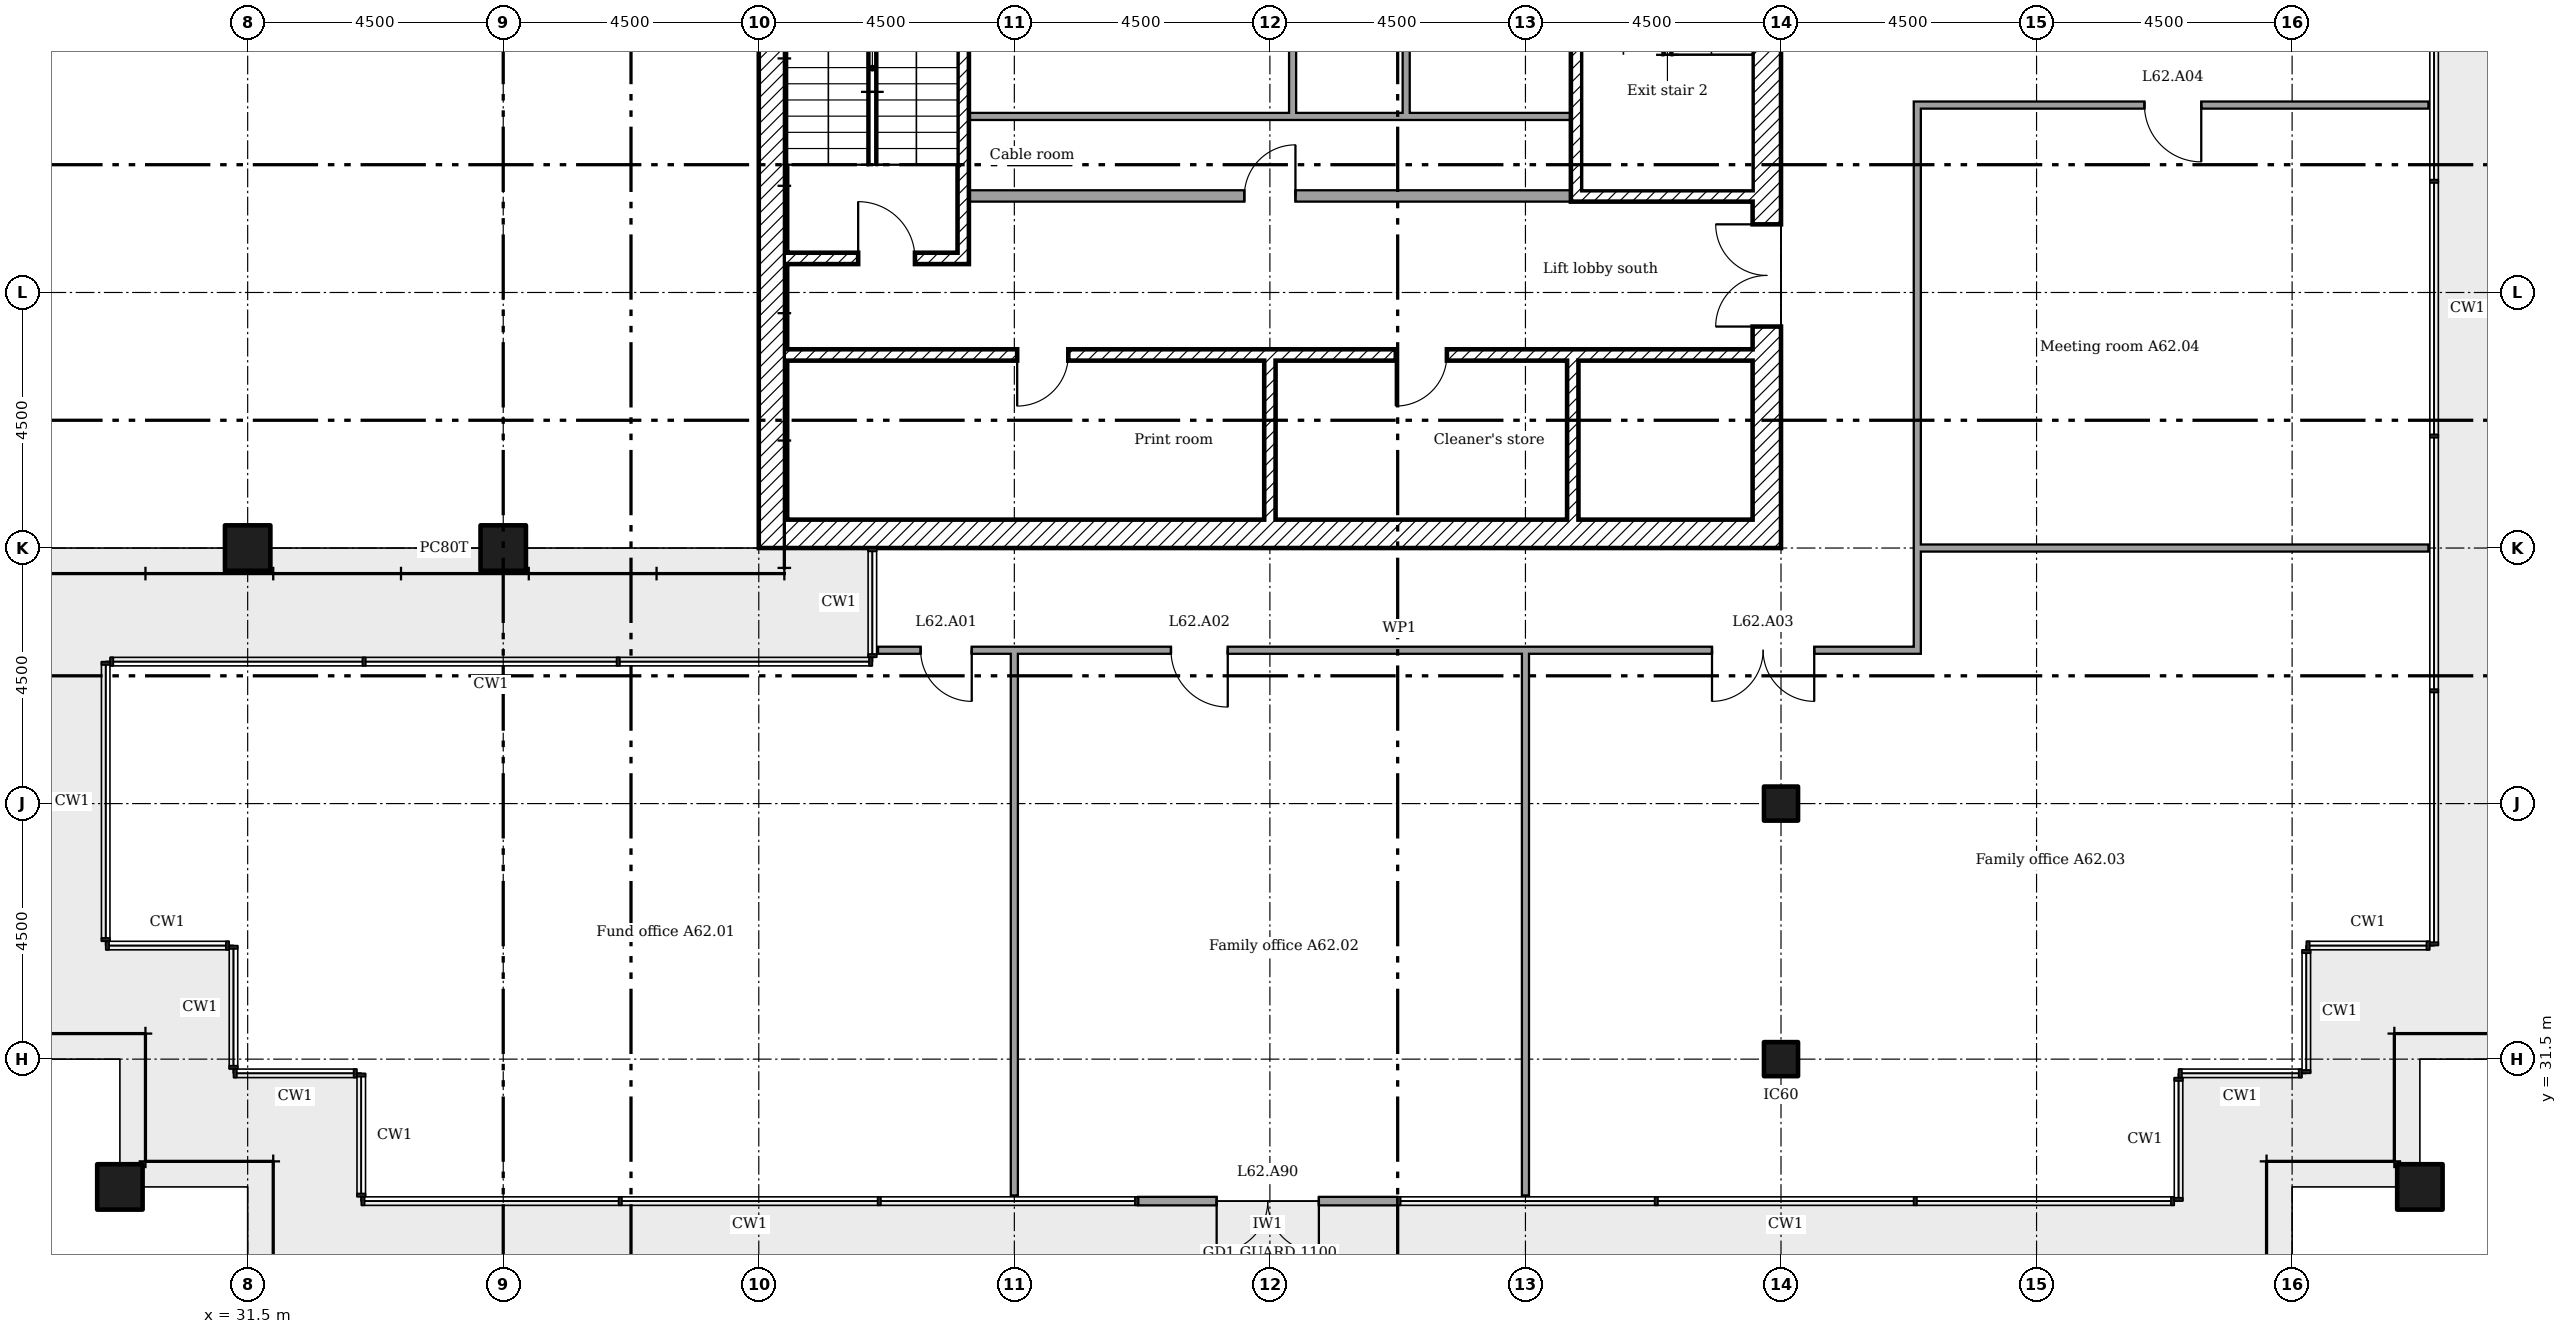
"""IFC4 building model, lengths in metres.
Left out: names, types, materials, properties, quantities, classifications, styles, units other than length and angle.
Written with IfcOpenShell. Run it as: python <this file> out.ifc"""

import sys

from ifc_helpers import new_model, si_unit, direction, frame, frame_2d, origin, origin_2d, place, context, subcontext, project, spatial, rectangle, extrude, element, fill, save


model = new_model("IFC4")
c1 = context("Model", 3, precision=1e-05, world=origin(), true_north=direction((0.0, 1.0)))
c2 = subcontext(c1, "Body", "Model", "MODEL_VIEW")
j1 = project(units=[si_unit("LENGTHUNIT", "METRE"), si_unit("PLANEANGLEUNIT", "RADIAN")], contexts=[c1])
p1 = place(None, origin())
s1 = spatial("IfcSite", under=j1, at=p1, CompositionType="ELEMENT")
p2 = place(p1, origin())
s2 = spatial("IfcBuilding", under=s1, at=p2, CompositionType="ELEMENT")
p3 = place(p2, frame((0.0, 0.0, 242.4)))
s3 = spatial("IfcBuildingStorey", under=s2, at=p3, CompositionType="ELEMENT", Elevation=242.4)
for number, where in (
    (1, (69.75, 29.25, 0.0)),
    (2, (36.0, 40.5, 0.0)),
    (3, (31.5, 40.5, 0.0)),
    (4, (29.25, 29.25, 0.0)),
):
    element("IfcColumn", number, at=place(p3, frame(where)), inside=s3, PredefinedType="COLUMN", context=c2, shape_type="SweptSolid", body=[
        extrude(rectangle(XDim=0.8, YDim=0.8, at=origin_2d()), origin(), (0.0, 0.0, 1.0), 3.6),
    ])
for number, where in (
    (5, (58.5, 31.5, 0.0)),
    (6, (58.5, 36.0, 0.0)),
):
    element("IfcColumn", number, at=place(p3, frame(where)), inside=s3, PredefinedType="COLUMN", context=c2, shape_type="SweptSolid", body=[
        extrude(rectangle(XDim=0.6, YDim=0.6, at=origin_2d()), origin(), (0.0, 0.0, 1.0), 3.6),
    ])
p4 = place(p3, frame((47.182, 29.0, 0.0)))
e7 = element("IfcWall", 7, at=p4, inside=s3, PredefinedType="SOLIDWALL", context=c2, shape_type="SweptSolid", body=[
    extrude(rectangle(XDim=4.561, YDim=0.15, at=frame_2d((2.28, 0.0))), origin(), (0.0, 0.0, 1.0), 3.4),
])
p5 = place(p4, frame((1.38, 0.0, 0.0)))
e8 = element("IfcOpeningElement", 8, at=p5, cuts=e7, PredefinedType="OPENING", context=c2, shape_type="SweptSolid", body=[
    extrude(rectangle(XDim=1.8, YDim=2.4, at=frame_2d((0.9, 1.2))), frame((0.0, 0.085, 0.0), z_axis=(0.0, -1.0, 0.0), x_axis=(1.0, 0.0, 0.0)), (0.0, 0.0, 1.0), 0.17),
])
p6 = place(p3, frame((58.25, 40.5, 0.0), z_axis=(0.0, 0.0, 1.0), x_axis=(0.0, 1.0, 0.0)))
e9 = element("IfcWall", 9, at=p6, inside=s3, PredefinedType="SHEAR", context=c2, shape_type="SweptSolid", body=[
    extrude(rectangle(XDim=18.0, YDim=0.5, at=frame_2d((9.0, 0.0))), origin(), (0.0, 0.0, 1.0), 3.3),
])
p7 = place(p6, frame((13.15, 0.0, 0.0)))
e10 = element("IfcOpeningElement", 10, at=p7, cuts=e9, PredefinedType="OPENING", context=c2, shape_type="SweptSolid", body=[
    extrude(rectangle(XDim=1.2, YDim=2.1, at=frame_2d((0.6, 1.05))), frame((0.0, 0.26, 0.0), z_axis=(0.0, -1.0, 0.0), x_axis=(1.0, 0.0, 0.0)), (0.0, 0.0, 1.0), 0.52),
])
p8 = place(p6, frame((3.9, 0.0, 0.0)))
e11 = element("IfcOpeningElement", 11, at=p8, cuts=e9, PredefinedType="OPENING", context=c2, shape_type="SweptSolid", body=[
    extrude(rectangle(XDim=1.8, YDim=2.1, at=frame_2d((0.9, 1.05))), frame((0.0, 0.26, 0.0), z_axis=(0.0, -1.0, 0.0), x_axis=(1.0, 0.0, 0.0)), (0.0, 0.0, 1.0), 0.52),
])
p9 = place(p6, frame((11.525, 0.0, 0.0)))
e12 = element("IfcOpeningElement", 12, at=p9, cuts=e9, PredefinedType="OPENING", context=c2, shape_type="SweptSolid", body=[
    extrude(rectangle(XDim=1.0, YDim=2.1, at=frame_2d((0.5, 1.05))), frame((0.0, 0.26, 0.0), z_axis=(0.0, -1.0, 0.0), x_axis=(1.0, 0.0, 0.0)), (0.0, 0.0, 1.0), 0.52),
])
p10 = place(p3, frame((40.5, 40.75, 0.0)))
e13 = element("IfcWall", 13, at=p10, inside=s3, PredefinedType="SHEAR", context=c2, shape_type="SweptSolid", body=[
    extrude(rectangle(XDim=17.5, YDim=0.5, at=frame_2d((8.75, 0.0))), origin(), (0.0, 0.0, 1.0), 3.3),
])
p11 = place(p3, frame((40.75, 41.0, 0.0), z_axis=(0.0, 0.0, 1.0), x_axis=(0.0, 1.0, 0.0)))
e14 = element("IfcWall", 14, at=p11, inside=s3, PredefinedType="SHEAR", context=c2, shape_type="SweptSolid", body=[
    extrude(rectangle(XDim=17.0, YDim=0.5, at=frame_2d((8.5, 0.0))), origin(), (0.0, 0.0, 1.0), 3.3),
])
for number, where, z_axis, x_axis in (
    (15, (49.5, 41.0, 0.0), (0.0, 0.0, 1.0), (0.0, 1.0, 0.0)),
    (16, (54.833, 41.0, 0.0), (0.0, 0.0, 1.0), (0.0, 1.0, 0.0)),
):
    element("IfcWall", number, at=place(p3, frame(where, z_axis=z_axis, x_axis=x_axis)), inside=s3, PredefinedType="SHEAR", context=c2, shape_type="SweptSolid", body=[
        extrude(rectangle(XDim=2.8, YDim=0.2, at=frame_2d((1.4, 0.0))), origin(), (0.0, 0.0, 1.0), 3.3),
    ])
p12 = place(p3, frame((41.0, 43.9, 0.0)))
e17 = element("IfcWall", 17, at=p12, inside=s3, PredefinedType="SHEAR", context=c2, shape_type="SweptSolid", body=[
    extrude(rectangle(XDim=17.0, YDim=0.2, at=frame_2d((8.5, 0.0))), origin(), (0.0, 0.0, 1.0), 3.3),
])
p13 = place(p12, frame((4.05, 0.0, 0.0)))
e18 = element("IfcOpeningElement", 18, at=p13, cuts=e17, PredefinedType="OPENING", context=c2, shape_type="SweptSolid", body=[
    extrude(rectangle(XDim=0.9, YDim=2.1, at=frame_2d((0.45, 1.05))), frame((0.0, 0.11, 0.0), z_axis=(0.0, -1.0, 0.0), x_axis=(1.0, 0.0, 0.0)), (0.0, 0.0, 1.0), 0.22),
])
p14 = place(p12, frame((10.717, 0.0, 0.0)))
e19 = element("IfcOpeningElement", 19, at=p14, cuts=e17, PredefinedType="OPENING", context=c2, shape_type="SweptSolid", body=[
    extrude(rectangle(XDim=0.9, YDim=2.1, at=frame_2d((0.45, 1.05))), frame((0.0, 0.11, 0.0), z_axis=(0.0, -1.0, 0.0), x_axis=(1.0, 0.0, 0.0)), (0.0, 0.0, 1.0), 0.22),
])
p15 = place(p3, frame((44.1, 45.5, 0.0), z_axis=(0.0, 0.0, 1.0), x_axis=(0.0, 1.0, 0.0)))
e20 = element("IfcWall", 20, at=p15, inside=s3, PredefinedType="SHEAR", context=c2, shape_type="SweptSolid", body=[
    extrude(rectangle(XDim=6.9, YDim=0.2, at=frame_2d((3.45, 0.0))), origin(), (0.0, 0.0, 1.0), 3.3),
])
p16 = place(p3, frame((41.0, 45.6, 0.0)))
e21 = element("IfcWall", 21, at=p16, inside=s3, PredefinedType="SHEAR", context=c2, shape_type="SweptSolid", body=[
    extrude(rectangle(XDim=3.0, YDim=0.2, at=frame_2d((1.5, 0.0))), origin(), (0.0, 0.0, 1.0), 3.3),
])
p17 = place(p16, frame((1.25, 0.0, 0.0)))
e22 = element("IfcOpeningElement", 22, at=p17, cuts=e21, PredefinedType="OPENING", context=c2, shape_type="SweptSolid", body=[
    extrude(rectangle(XDim=1.0, YDim=2.1, at=frame_2d((0.5, 1.05))), frame((0.0, 0.11, 0.0), z_axis=(0.0, -1.0, 0.0), x_axis=(1.0, 0.0, 0.0)), (0.0, 0.0, 1.0), 0.22),
])
p18 = place(p3, frame((54.8, 46.7, 0.0)))
e23 = element("IfcWall", 23, at=p18, inside=s3, PredefinedType="SHEAR", context=c2, shape_type="SweptSolid", body=[
    extrude(rectangle(XDim=3.2, YDim=0.2, at=frame_2d((1.6, 0.0))), origin(), (0.0, 0.0, 1.0), 3.3),
])
p19 = place(p3, frame((54.9, 46.8, 0.0), z_axis=(0.0, 0.0, 1.0), x_axis=(0.0, 1.0, 0.0)))
e24 = element("IfcWall", 24, at=p19, inside=s3, PredefinedType="SHEAR", context=c2, shape_type="SweptSolid", body=[
    extrude(rectangle(XDim=6.5, YDim=0.2, at=frame_2d((3.25, 0.0))), origin(), (0.0, 0.0, 1.0), 3.3),
])
p20 = place(p3, frame((44.2, 46.7, 0.0)))
e25 = element("IfcWall", 25, at=p20, inside=s3, PredefinedType="PARTITIONING", context=c2, shape_type="SweptSolid", body=[
    extrude(rectangle(XDim=10.6, YDim=0.2, at=frame_2d((5.3, 0.0))), origin(), (0.0, 0.0, 1.0), 3.3),
])
p21 = place(p20, frame((4.85, 0.0, 0.0)))
e26 = element("IfcOpeningElement", 26, at=p21, cuts=e25, PredefinedType="OPENING", context=c2, shape_type="SweptSolid", body=[
    extrude(rectangle(XDim=0.9, YDim=2.1, at=frame_2d((0.45, 1.05))), frame((0.0, 0.11, 0.0), z_axis=(0.0, -1.0, 0.0), x_axis=(1.0, 0.0, 0.0)), (0.0, 0.0, 1.0), 0.22),
])
p22 = place(p3, frame((49.962, 48.1, 0.0), z_axis=(0.0, 0.0, 1.0), x_axis=(-1.0, 0.0, 0.0)))
e27 = element("IfcWall", 27, at=p22, inside=s3, PredefinedType="PARTITIONING", context=c2, shape_type="SweptSolid", body=[
    extrude(rectangle(XDim=5.762, YDim=0.125, at=frame_2d((2.881, 0.0))), origin(), (0.0, 0.0, 1.0), 3.3),
])
p23 = place(p3, frame((51.962, 48.1, 0.0), z_axis=(0.0, 0.0, 1.0), x_axis=(-1.0, 0.0, 0.0)))
e28 = element("IfcWall", 28, at=p23, inside=s3, PredefinedType="PARTITIONING", context=c2, shape_type="SweptSolid", body=[
    extrude(rectangle(XDim=2.062, YDim=0.125, at=frame_2d((1.031, 0.0))), origin(), (0.0, 0.0, 1.0), 3.3),
])
p24 = place(p3, frame((49.9, 48.163, 0.0), z_axis=(0.0, 0.0, 1.0), x_axis=(0.0, 1.0, 0.0)))
e29 = element("IfcWall", 29, at=p24, inside=s3, PredefinedType="PARTITIONING", context=c2, shape_type="SweptSolid", body=[
    extrude(rectangle(XDim=3.637, YDim=0.125, at=frame_2d((1.819, 0.0))), origin(), (0.0, 0.0, 1.0), 3.3),
])
p25 = place(p3, frame((54.8, 48.1, 0.0), z_axis=(0.0, 0.0, 1.0), x_axis=(-1.0, 0.0, 0.0)))
e30 = element("IfcWall", 30, at=p25, inside=s3, PredefinedType="PARTITIONING", context=c2, shape_type="SweptSolid", body=[
    extrude(rectangle(XDim=2.9, YDim=0.125, at=frame_2d((1.45, 0.0))), origin(), (0.0, 0.0, 1.0), 3.3),
])
p26 = place(p3, frame((51.9, 48.163, 0.0), z_axis=(0.0, 0.0, 1.0), x_axis=(0.0, 1.0, 0.0)))
e31 = element("IfcWall", 31, at=p26, inside=s3, PredefinedType="PARTITIONING", context=c2, shape_type="SweptSolid", body=[
    extrude(rectangle(XDim=3.637, YDim=0.125, at=frame_2d((1.819, 0.0))), origin(), (0.0, 0.0, 1.0), 3.3),
])
p27 = place(p3, frame((42.6, 38.7, 0.0)))
e32 = element("IfcWall", 32, at=p27, inside=s3, PredefinedType="PARTITIONING", context=c2, shape_type="SweptSolid", body=[
    extrude(rectangle(XDim=18.362, YDim=0.125, at=frame_2d((9.181, 0.0))), origin(), (0.0, 0.0, 1.0), 3.4),
])
p28 = place(p27, frame((0.75, 0.0, 0.0)))
e33 = element("IfcOpeningElement", 33, at=p28, cuts=e32, PredefinedType="OPENING", context=c2, shape_type="SweptSolid", body=[
    extrude(rectangle(XDim=0.9, YDim=2.1, at=frame_2d((0.45, 1.05))), frame((0.0, 0.073, 0.0), z_axis=(0.0, -1.0, 0.0), x_axis=(1.0, 0.0, 0.0)), (0.0, 0.0, 1.0), 0.145),
])
p29 = place(p27, frame((5.158, 0.0, 0.0)))
e34 = element("IfcOpeningElement", 34, at=p29, cuts=e32, PredefinedType="OPENING", context=c2, shape_type="SweptSolid", body=[
    extrude(rectangle(XDim=1.0, YDim=2.1, at=frame_2d((0.5, 1.05))), frame((0.0, 0.073, 0.0), z_axis=(0.0, -1.0, 0.0), x_axis=(1.0, 0.0, 0.0)), (0.0, 0.0, 1.0), 0.145),
])
p30 = place(p27, frame((14.685, 0.0, 0.0)))
e35 = element("IfcOpeningElement", 35, at=p30, cuts=e32, PredefinedType="OPENING", context=c2, shape_type="SweptSolid", body=[
    extrude(rectangle(XDim=1.8, YDim=2.1, at=frame_2d((0.9, 1.05))), frame((0.0, 0.073, 0.0), z_axis=(0.0, -1.0, 0.0), x_axis=(1.0, 0.0, 0.0)), (0.0, 0.0, 1.0), 0.145),
])
p31 = place(p3, frame((60.9, 40.5, 0.0)))
e36 = element("IfcWall", 36, at=p31, inside=s3, PredefinedType="PARTITIONING", context=c2, shape_type="SweptSolid", body=[
    extrude(rectangle(XDim=9.0, YDim=0.125, at=frame_2d((4.5, 0.0))), origin(), (0.0, 0.0, 1.0), 2.626),
])
p32 = place(p3, frame((60.837, 48.3, 0.0)))
e37 = element("IfcWall", 37, at=p32, inside=s3, PredefinedType="PARTITIONING", context=c2, shape_type="SweptSolid", body=[
    extrude(rectangle(XDim=9.062, YDim=0.125, at=frame_2d((4.531, 0.0))), origin(), (0.0, 0.0, 1.0), 3.4),
])
p33 = place(p32, frame((4.062, 0.0, 0.0)))
e38 = element("IfcOpeningElement", 38, at=p33, cuts=e37, PredefinedType="OPENING", context=c2, shape_type="SweptSolid", body=[
    extrude(rectangle(XDim=1.0, YDim=2.1, at=frame_2d((0.5, 1.05))), frame((0.0, 0.073, 0.0), z_axis=(0.0, -1.0, 0.0), x_axis=(1.0, 0.0, 0.0)), (0.0, 0.0, 1.0), 0.145),
])
for number, where, z_axis, x_axis in (
    (39, (45.0, 29.1, 0.0), (0.0, 0.0, 1.0), (0.0, 1.0, 0.0)),
    (40, (54.0, 29.1, 0.0), (0.0, 0.0, 1.0), (0.0, 1.0, 0.0)),
):
    element("IfcWall", number, at=place(p3, frame(where, z_axis=z_axis, x_axis=x_axis)), inside=s3, PredefinedType="PARTITIONING", context=c2, shape_type="SweptSolid", body=[
        extrude(rectangle(XDim=9.6, YDim=0.125, at=frame_2d((4.8, 0.0))), origin(), (0.0, 0.0, 1.0), 2.626),
    ])
p34 = place(p3, frame((60.9, 38.762, 0.0), z_axis=(0.0, 0.0, 1.0), x_axis=(0.0, 1.0, 0.0)))
e41 = element("IfcWall", 41, at=p34, inside=s3, PredefinedType="PARTITIONING", context=c2, shape_type="SweptSolid", body=[
    extrude(rectangle(XDim=9.475, YDim=0.125, at=frame_2d((4.738, 0.0))), origin(), (0.0, 0.0, 1.0), 3.4),
])
p35 = place(p5, frame((1.8, 0.0, 0.0), x_axis=(-1.0, 0.0, 0.0)))
e42 = element("IfcDoor", 42, at=p35, inside=s3, OperationType="DOUBLE_DOOR_DOUBLE_SWING", PredefinedType="NOTDEFINED", context=c2, shape_type="SweptSolid", body=[
    extrude(rectangle(XDim=1.8, YDim=2.4, at=frame_2d((0.9, 1.2))), frame((0.0, 0.025, 0.0), z_axis=(0.0, -1.0, 0.0), x_axis=(1.0, 0.0, 0.0)), (0.0, 0.0, 1.0), 0.05),
])
fill(e8, e42)
p36 = place(p8, origin())
e43 = element("IfcDoor", 43, at=p36, inside=s3, OperationType="DOUBLE_DOOR_SINGLE_SWING", PredefinedType="DOOR", context=c2, shape_type="SweptSolid", body=[
    extrude(rectangle(XDim=1.8, YDim=2.1, at=frame_2d((0.9, 1.05))), frame((0.0, 0.025, 0.0), z_axis=(0.0, -1.0, 0.0), x_axis=(1.0, 0.0, 0.0)), (0.0, 0.0, 1.0), 0.05),
])
fill(e11, e43)
p37 = place(p17, origin())
e44 = element("IfcDoor", 44, at=p37, inside=s3, OperationType="SINGLE_SWING_RIGHT", PredefinedType="DOOR", context=c2, shape_type="SweptSolid", body=[
    extrude(rectangle(XDim=1.0, YDim=2.1, at=frame_2d((0.5, 1.05))), frame((0.0, 0.025, 0.0), z_axis=(0.0, -1.0, 0.0), x_axis=(1.0, 0.0, 0.0)), (0.0, 0.0, 1.0), 0.05),
])
fill(e22, e44)
p38 = place(p13, frame((0.9, 0.0, 0.0), x_axis=(-1.0, 0.0, 0.0)))
e45 = element("IfcDoor", 45, at=p38, inside=s3, OperationType="SINGLE_SWING_LEFT", PredefinedType="DOOR", context=c2, shape_type="SweptSolid", body=[
    extrude(rectangle(XDim=0.9, YDim=2.1, at=frame_2d((0.45, 1.05))), frame((0.0, 0.025, 0.0), z_axis=(0.0, -1.0, 0.0), x_axis=(1.0, 0.0, 0.0)), (0.0, 0.0, 1.0), 0.05),
])
fill(e18, e45)
p39 = place(p14, frame((0.9, 0.0, 0.0), x_axis=(-1.0, 0.0, 0.0)))
e46 = element("IfcDoor", 46, at=p39, inside=s3, OperationType="SINGLE_SWING_LEFT", PredefinedType="DOOR", context=c2, shape_type="SweptSolid", body=[
    extrude(rectangle(XDim=0.9, YDim=2.1, at=frame_2d((0.45, 1.05))), frame((0.0, 0.025, 0.0), z_axis=(0.0, -1.0, 0.0), x_axis=(1.0, 0.0, 0.0)), (0.0, 0.0, 1.0), 0.05),
])
fill(e19, e46)
p40 = place(p21, origin())
e47 = element("IfcDoor", 47, at=p40, inside=s3, OperationType="SINGLE_SWING_LEFT", PredefinedType="DOOR", context=c2, shape_type="SweptSolid", body=[
    extrude(rectangle(XDim=0.9, YDim=2.1, at=frame_2d((0.45, 1.05))), frame((0.0, 0.025, 0.0), z_axis=(0.0, -1.0, 0.0), x_axis=(1.0, 0.0, 0.0)), (0.0, 0.0, 1.0), 0.05),
])
fill(e26, e47)
p41 = place(p28, frame((0.9, 0.0, 0.0), x_axis=(-1.0, 0.0, 0.0)))
e48 = element("IfcDoor", 48, at=p41, inside=s3, OperationType="SINGLE_SWING_RIGHT", PredefinedType="DOOR", context=c2, shape_type="SweptSolid", body=[
    extrude(rectangle(XDim=0.9, YDim=2.1, at=frame_2d((0.45, 1.05))), frame((0.0, 0.025, 0.0), z_axis=(0.0, -1.0, 0.0), x_axis=(1.0, 0.0, 0.0)), (0.0, 0.0, 1.0), 0.05),
])
fill(e33, e48)
p42 = place(p29, frame((1.0, 0.0, 0.0), x_axis=(-1.0, 0.0, 0.0)))
e49 = element("IfcDoor", 49, at=p42, inside=s3, OperationType="SINGLE_SWING_RIGHT", PredefinedType="DOOR", context=c2, shape_type="SweptSolid", body=[
    extrude(rectangle(XDim=1.0, YDim=2.1, at=frame_2d((0.5, 1.05))), frame((0.0, 0.025, 0.0), z_axis=(0.0, -1.0, 0.0), x_axis=(1.0, 0.0, 0.0)), (0.0, 0.0, 1.0), 0.05),
])
fill(e34, e49)
p43 = place(p30, frame((1.8, 0.0, 0.0), x_axis=(-1.0, 0.0, 0.0)))
e50 = element("IfcDoor", 50, at=p43, inside=s3, OperationType="DOUBLE_DOOR_SINGLE_SWING", PredefinedType="DOOR", context=c2, shape_type="SweptSolid", body=[
    extrude(rectangle(XDim=1.8, YDim=2.1, at=frame_2d((0.9, 1.05))), frame((0.0, 0.025, 0.0), z_axis=(0.0, -1.0, 0.0), x_axis=(1.0, 0.0, 0.0)), (0.0, 0.0, 1.0), 0.05),
])
fill(e35, e50)
p44 = place(p33, frame((1.0, 0.0, 0.0), x_axis=(-1.0, 0.0, 0.0)))
e51 = element("IfcDoor", 51, at=p44, inside=s3, OperationType="SINGLE_SWING_RIGHT", PredefinedType="DOOR", context=c2, shape_type="SweptSolid", body=[
    extrude(rectangle(XDim=1.0, YDim=2.1, at=frame_2d((0.5, 1.05))), frame((0.0, 0.025, 0.0), z_axis=(0.0, -1.0, 0.0), x_axis=(1.0, 0.0, 0.0)), (0.0, 0.0, 1.0), 0.05),
])
fill(e38, e51)
save(model, sys.argv[1])
